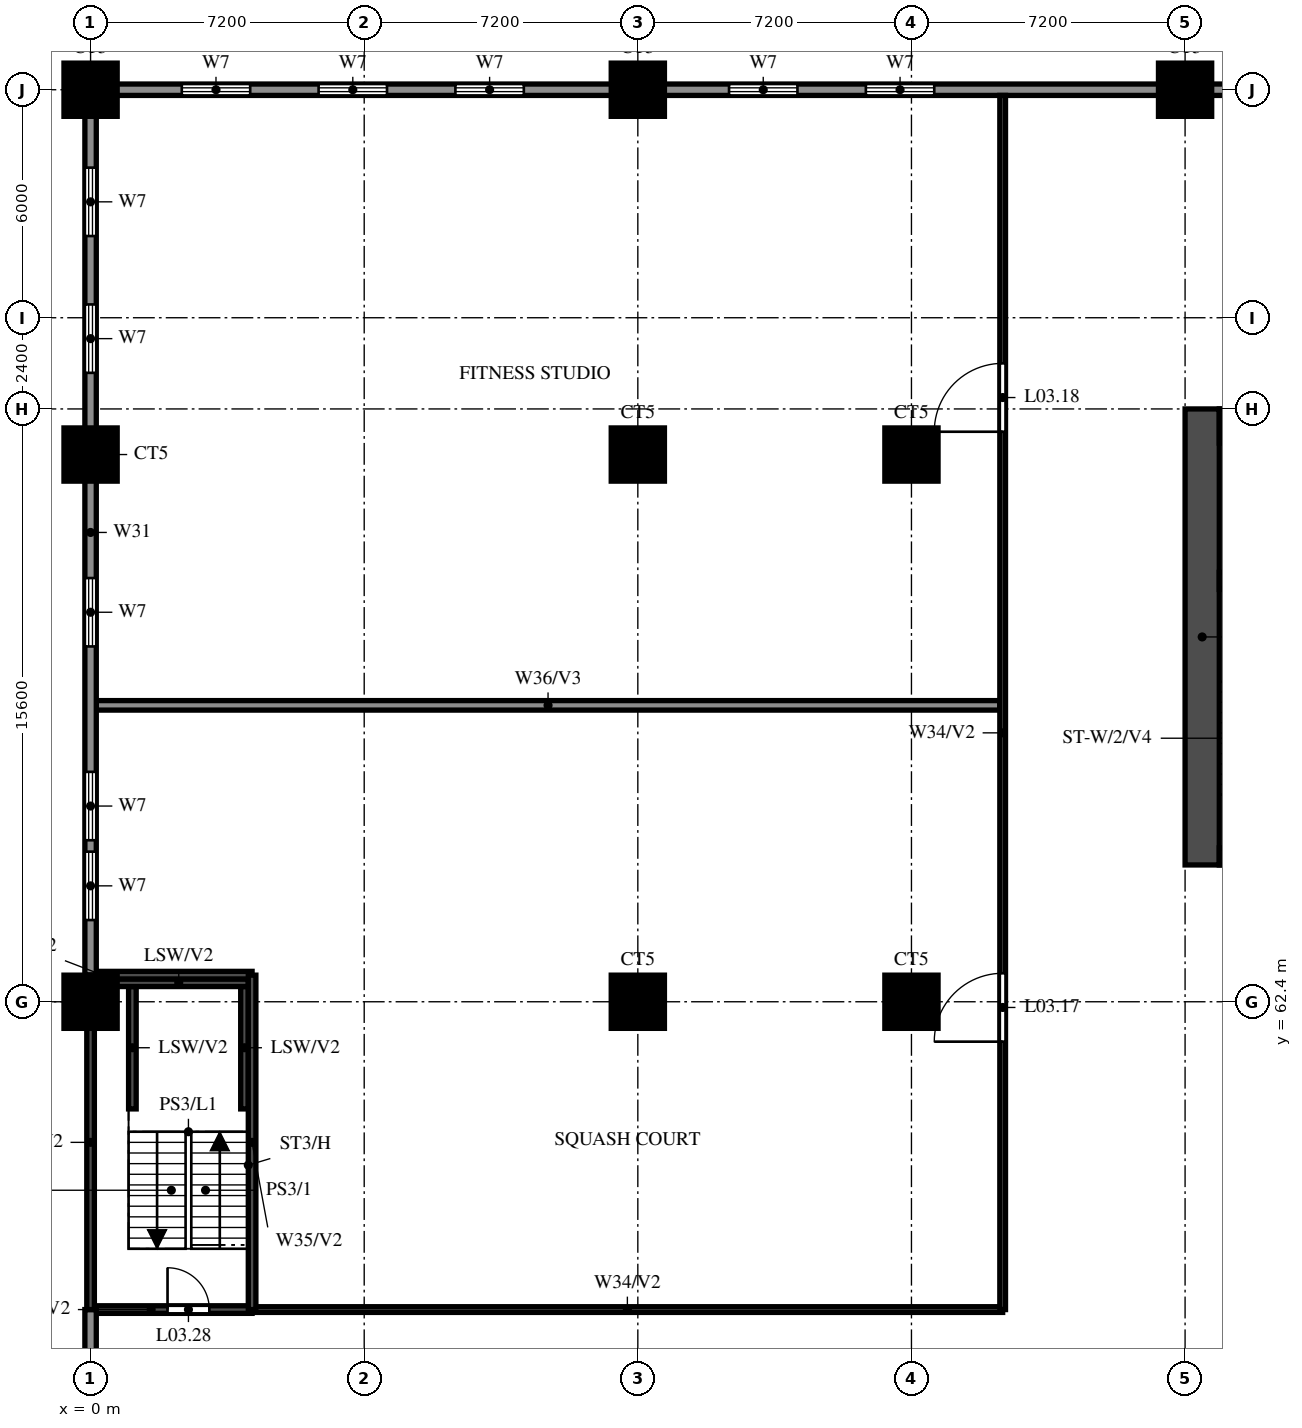
"""IFC4 building model, lengths in metres.
Left out: names, types, materials, properties, quantities, classifications, styles, units other than length and angle.
Written with IfcOpenShell. Run it as: python <this file> out.ifc"""

import sys

from ifc_helpers import new_model, si_unit, direction, frame, frame_2d, origin, origin_2d, place, context, subcontext, project, spatial, rectangle, circle, extrude, source, transform, mapped, element, fill, save


model = new_model("IFC4")
c1 = context("Model", 3, precision=1e-05, world=origin(), true_north=direction((0.0, 1.0)))
c2 = subcontext(c1, "Body", "Model", "MODEL_VIEW")
j1 = project(units=[si_unit("LENGTHUNIT", "METRE"), si_unit("PLANEANGLEUNIT", "RADIAN")], contexts=[c1])
p1 = place(None, origin())
s1 = spatial("IfcSite", under=j1, at=p1, CompositionType="ELEMENT")
p2 = place(p1, origin())
s2 = spatial("IfcBuilding", under=s1, at=p2, CompositionType="ELEMENT")
p3 = place(p2, frame((0.0, 0.0, 17.4)))
s3 = spatial("IfcBuildingStorey", under=s2, at=p3, CompositionType="ELEMENT", Elevation=17.4)
m1 = source(origin(), c2, "Body", "SweptSolid", [
    extrude(circle(Radius=0.7, at=origin_2d()), origin(), (0.0, 0.0, 1.0), 3.8),
])
for number, where, z_axis, x_axis in (
    (1, (0.0, 62.4, 0.0), (0.0, 0.0, 1.0), (1.0, 0.0, 0.0)),
    (2, (14.4, 62.4, 0.0), (0.0, 0.0, 1.0), (1.0, 0.0, 0.0)),
    (3, (21.6, 62.4, 0.0), (0.0, 0.0, 1.0), (1.0, 0.0, 0.0)),
    (4, (0.0, 76.8, 0.0), (0.0, 0.0, 1.0), (1.0, 0.0, 0.0)),
    (5, (14.4, 76.8, 0.0), (0.0, 0.0, 1.0), (1.0, 0.0, 0.0)),
    (6, (21.6, 76.8, 0.0), (0.0, 0.0, 1.0), (1.0, 0.0, 0.0)),
    (7, (0.0, 86.4, 0.0), (0.0, 0.0, 1.0), (1.0, 0.0, 0.0)),
    (8, (14.4, 86.4, 0.0), (0.0, 0.0, 1.0), (1.0, 0.0, 0.0)),
    (9, (28.8, 86.4, 0.0), (0.0, 0.0, 1.0), (1.0, 0.0, 0.0)),
):
    element("IfcColumn", number, at=place(p3, frame(where, z_axis=z_axis, x_axis=x_axis)), inside=s3, PredefinedType="COLUMN", context=c2, shape_type="MappedRepresentation", body=[
        mapped(m1, transform((0.0, 0.0, 0.0))),
    ])
p4 = place(p3, frame((29.25, 66.0, 0.0), z_axis=(0.0, 0.0, 1.0), x_axis=(0.0, 1.0, 0.0)))
e10 = element("IfcWall", 10, at=p4, inside=s3, PredefinedType="SHEAR", context=c2, shape_type="SweptSolid", body=[
    extrude(rectangle(XDim=12.0, YDim=0.9, at=frame_2d((6.0, 0.0))), origin(), (0.0, 0.0, 1.0), 3.8),
])
p5 = place(p3, frame((29.7, 77.55, 0.0), z_axis=(0.0, 0.0, 1.0), x_axis=(1.0, 0.0, 0.0)))
e11 = element("IfcWall", 11, at=p5, inside=s3, PredefinedType="SHEAR", context=c2, shape_type="SweptSolid", body=[
    extrude(rectangle(XDim=41.4, YDim=0.9, at=frame_2d((20.7, 0.0))), origin(), (0.0, 0.0, 1.0), 3.8),
])
p6 = place(p3, frame((29.7, 66.225, 0.0), z_axis=(0.0, 0.0, 1.0), x_axis=(1.0, 0.0, 0.0)))
e12 = element("IfcWall", 12, at=p6, inside=s3, PredefinedType="SHEAR", context=c2, shape_type="SweptSolid", body=[
    extrude(rectangle(XDim=41.4, YDim=0.45, at=frame_2d((20.7, 0.0))), origin(), (0.0, 0.0, 1.0), 3.8),
])
p7 = place(p6, frame((0.925, 0.0, 0.0)))
e13 = element("IfcOpeningElement", 13, at=p7, cuts=e12, PredefinedType="OPENING", context=c2, shape_type="SweptSolid", body=[
    extrude(rectangle(XDim=1.1, YDim=2.1, at=frame_2d((0.55, 1.05))), frame((0.0, 0.235, 0.0), z_axis=(0.0, -1.0, 0.0), x_axis=(1.0, 0.0, 0.0)), (0.0, 0.0, 1.0), 0.47),
])
p8 = place(p6, frame((3.738, 0.0, 0.0)))
e14 = element("IfcOpeningElement", 14, at=p8, cuts=e12, PredefinedType="OPENING", context=c2, shape_type="SweptSolid", body=[
    extrude(rectangle(XDim=1.8, YDim=2.1, at=frame_2d((0.9, 1.05))), frame((0.0, 0.235, 0.0), z_axis=(0.0, -1.0, 0.0), x_axis=(1.0, 0.0, 0.0)), (0.0, 0.0, 1.0), 0.47),
])
p9 = place(p3, frame((29.7, 73.475, 0.0), z_axis=(0.0, 0.0, 1.0), x_axis=(1.0, 0.0, 0.0)))
e15 = element("IfcWall", 15, at=p9, inside=s3, PredefinedType="SHEAR", context=c2, shape_type="SweptSolid", body=[
    extrude(rectangle(XDim=3.175, YDim=0.45, at=frame_2d((1.587, 0.0))), origin(), (0.0, 0.0, 1.0), 3.8),
])
for number, where, z_axis, x_axis in (
    (16, (1.1, 59.58, 0.0), (0.0, 0.0, 1.0), (0.0, 1.0, 0.0)),
    (17, (4.05, 59.58, 0.0), (0.0, 0.0, 1.0), (0.0, 1.0, 0.0)),
):
    element("IfcWall", number, at=place(p3, frame(where, z_axis=z_axis, x_axis=x_axis)), inside=s3, PredefinedType="SOLIDWALL", context=c2, shape_type="SweptSolid", body=[
        extrude(rectangle(XDim=3.22, YDim=0.2, at=frame_2d((1.61, 0.0))), origin(), (0.0, 0.0, 1.0), 1.9),
    ])
p10 = place(p3, frame((0.49, 62.9, 0.0), z_axis=(0.0, 0.0, 1.0), x_axis=(1.0, 0.0, 0.0)))
e18 = element("IfcWall", 18, at=p10, inside=s3, PredefinedType="SOLIDWALL", context=c2, shape_type="SweptSolid", body=[
    extrude(rectangle(XDim=3.66, YDim=0.2, at=frame_2d((1.83, 0.0))), origin(), (0.0, 0.0, 1.0), 1.9),
])
p11 = place(p3, frame((4.25, 54.3, 0.0), z_axis=(0.0, 0.0, 1.0), x_axis=(1.0, 0.0, 0.0)))
e19 = element("IfcWall", 19, at=p11, inside=s3, PredefinedType="PARTITIONING", context=c2, shape_type="SweptSolid", body=[
    extrude(rectangle(XDim=19.75, YDim=0.15, at=frame_2d((9.875, 0.0))), origin(), (0.0, 0.0, 1.0), 2.6),
])
p12 = place(p3, frame((0.0, 54.3, 0.0), z_axis=(0.0, 0.0, 1.0), x_axis=(1.0, 0.0, 0.0)))
e20 = element("IfcWall", 20, at=p12, inside=s3, PredefinedType="SOLIDWALL", context=c2, shape_type="SweptSolid", body=[
    extrude(rectangle(XDim=4.25, YDim=0.2, at=frame_2d((2.125, 0.0))), origin(), (0.0, 0.0, 1.0), 3.8),
])
p13 = place(p12, frame((2.025, 0.0, 0.0)))
e21 = element("IfcOpeningElement", 21, at=p13, cuts=e20, PredefinedType="OPENING", context=c2, shape_type="SweptSolid", body=[
    extrude(rectangle(XDim=1.1, YDim=2.1, at=frame_2d((0.55, 1.05))), frame((0.0, 0.11, 0.0), z_axis=(0.0, -1.0, 0.0), x_axis=(1.0, 0.0, 0.0)), (0.0, 0.0, 1.0), 0.22),
])
p14 = place(p3, frame((0.0, 63.1, 0.0), z_axis=(0.0, 0.0, 1.0), x_axis=(1.0, 0.0, 0.0)))
e22 = element("IfcWall", 22, at=p14, inside=s3, PredefinedType="SOLIDWALL", context=c2, shape_type="SweptSolid", body=[
    extrude(rectangle(XDim=4.25, YDim=0.2, at=frame_2d((2.125, 0.0))), origin(), (0.0, 0.0, 1.0), 3.8),
])
p15 = place(p3, frame((0.15, 70.2, 0.0), z_axis=(0.0, 0.0, 1.0), x_axis=(1.0, 0.0, 0.0)))
e23 = element("IfcWall", 23, at=p15, inside=s3, PredefinedType="SOLIDWALL", context=c2, shape_type="SweptSolid", body=[
    extrude(rectangle(XDim=23.775, YDim=0.25, at=frame_2d((11.888, 0.0))), origin(), (0.0, 0.0, 1.0), 2.6),
])
p16 = place(p3, frame((0.0, 86.4, 0.0), z_axis=(0.0, 0.0, 1.0), x_axis=(1.0, 0.0, 0.0)))
e24 = element("IfcWall", 24, at=p16, inside=s3, PredefinedType="SOLIDWALL", context=c2, shape_type="SweptSolid", body=[
    extrude(rectangle(XDim=100.8, YDim=0.3, at=frame_2d((50.4, 0.0))), origin(), (0.0, 0.0, 1.0), 3.8),
])
p17 = place(p16, frame((2.4, 0.0, 0.6)))
e25 = element("IfcOpeningElement", 25, at=p17, cuts=e24, PredefinedType="OPENING", context=c2, shape_type="SweptSolid", body=[
    extrude(rectangle(XDim=1.8, YDim=2.4, at=frame_2d((0.9, 1.2))), frame((0.0, 0.16, 0.0), z_axis=(0.0, -1.0, 0.0), x_axis=(1.0, 0.0, 0.0)), (0.0, 0.0, 1.0), 0.32),
])
p18 = place(p16, frame((6.0, 0.0, 0.6)))
e26 = element("IfcOpeningElement", 26, at=p18, cuts=e24, PredefinedType="OPENING", context=c2, shape_type="SweptSolid", body=[
    extrude(rectangle(XDim=1.8, YDim=2.4, at=frame_2d((0.9, 1.2))), frame((0.0, 0.16, 0.0), z_axis=(0.0, -1.0, 0.0), x_axis=(1.0, 0.0, 0.0)), (0.0, 0.0, 1.0), 0.32),
])
p19 = place(p16, frame((9.6, 0.0, 0.6)))
e27 = element("IfcOpeningElement", 27, at=p19, cuts=e24, PredefinedType="OPENING", context=c2, shape_type="SweptSolid", body=[
    extrude(rectangle(XDim=1.8, YDim=2.4, at=frame_2d((0.9, 1.2))), frame((0.0, 0.16, 0.0), z_axis=(0.0, -1.0, 0.0), x_axis=(1.0, 0.0, 0.0)), (0.0, 0.0, 1.0), 0.32),
])
p20 = place(p16, frame((16.8, 0.0, 0.6)))
e28 = element("IfcOpeningElement", 28, at=p20, cuts=e24, PredefinedType="OPENING", context=c2, shape_type="SweptSolid", body=[
    extrude(rectangle(XDim=1.8, YDim=2.4, at=frame_2d((0.9, 1.2))), frame((0.0, 0.16, 0.0), z_axis=(0.0, -1.0, 0.0), x_axis=(1.0, 0.0, 0.0)), (0.0, 0.0, 1.0), 0.32),
])
p21 = place(p16, frame((20.4, 0.0, 0.6)))
e29 = element("IfcOpeningElement", 29, at=p21, cuts=e24, PredefinedType="OPENING", context=c2, shape_type="SweptSolid", body=[
    extrude(rectangle(XDim=1.8, YDim=2.4, at=frame_2d((0.9, 1.2))), frame((0.0, 0.16, 0.0), z_axis=(0.0, -1.0, 0.0), x_axis=(1.0, 0.0, 0.0)), (0.0, 0.0, 1.0), 0.32),
])
p22 = place(p16, frame((78.0, 0.0, 0.6)))
e30 = element("IfcOpeningElement", 30, at=p22, cuts=e24, PredefinedType="OPENING", context=c2, shape_type="SweptSolid", body=[
    extrude(rectangle(XDim=1.8, YDim=2.4, at=frame_2d((0.9, 1.2))), frame((0.0, 0.16, 0.0), z_axis=(0.0, -1.0, 0.0), x_axis=(1.0, 0.0, 0.0)), (0.0, 0.0, 1.0), 0.32),
])
p23 = place(p16, frame((81.6, 0.0, 0.6)))
e31 = element("IfcOpeningElement", 31, at=p23, cuts=e24, PredefinedType="OPENING", context=c2, shape_type="SweptSolid", body=[
    extrude(rectangle(XDim=1.8, YDim=2.4, at=frame_2d((0.9, 1.2))), frame((0.0, 0.16, 0.0), z_axis=(0.0, -1.0, 0.0), x_axis=(1.0, 0.0, 0.0)), (0.0, 0.0, 1.0), 0.32),
])
p24 = place(p16, frame((88.8, 0.0, 0.6)))
e32 = element("IfcOpeningElement", 32, at=p24, cuts=e24, PredefinedType="OPENING", context=c2, shape_type="SweptSolid", body=[
    extrude(rectangle(XDim=1.8, YDim=2.4, at=frame_2d((0.9, 1.2))), frame((0.0, 0.16, 0.0), z_axis=(0.0, -1.0, 0.0), x_axis=(1.0, 0.0, 0.0)), (0.0, 0.0, 1.0), 0.32),
])
p25 = place(p16, frame((92.4, 0.0, 0.6)))
e33 = element("IfcOpeningElement", 33, at=p25, cuts=e24, PredefinedType="OPENING", context=c2, shape_type="SweptSolid", body=[
    extrude(rectangle(XDim=1.8, YDim=2.4, at=frame_2d((0.9, 1.2))), frame((0.0, 0.16, 0.0), z_axis=(0.0, -1.0, 0.0), x_axis=(1.0, 0.0, 0.0)), (0.0, 0.0, 1.0), 0.32),
])
p26 = place(p16, frame((96.0, 0.0, 0.6)))
e34 = element("IfcOpeningElement", 34, at=p26, cuts=e24, PredefinedType="OPENING", context=c2, shape_type="SweptSolid", body=[
    extrude(rectangle(XDim=1.8, YDim=2.4, at=frame_2d((0.9, 1.2))), frame((0.0, 0.16, 0.0), z_axis=(0.0, -1.0, 0.0), x_axis=(1.0, 0.0, 0.0)), (0.0, 0.0, 1.0), 0.32),
])
p27 = place(p3, frame((0.0, 51.1, 0.0), z_axis=(0.0, 0.0, 1.0), x_axis=(0.0, 1.0, 0.0)))
e35 = element("IfcWall", 35, at=p27, inside=s3, PredefinedType="SOLIDWALL", context=c2, shape_type="SweptSolid", body=[
    extrude(rectangle(XDim=3.2, YDim=0.3, at=frame_2d((1.6, 0.0))), origin(), (0.0, 0.0, 1.0), 3.8),
])
p28 = place(p3, frame((0.0, 63.1, 0.0), z_axis=(0.0, 0.0, 1.0), x_axis=(0.0, 1.0, 0.0)))
e36 = element("IfcWall", 36, at=p28, inside=s3, PredefinedType="SOLIDWALL", context=c2, shape_type="SweptSolid", body=[
    extrude(rectangle(XDim=23.3, YDim=0.3, at=frame_2d((11.65, 0.0))), origin(), (0.0, 0.0, 1.0), 3.8),
])
p29 = place(p28, frame((1.45, 0.0, 0.6)))
e37 = element("IfcOpeningElement", 37, at=p29, cuts=e36, PredefinedType="OPENING", context=c2, shape_type="SweptSolid", body=[
    extrude(rectangle(XDim=1.8, YDim=2.4, at=frame_2d((0.9, 1.2))), frame((0.0, 0.16, 0.0), z_axis=(0.0, -1.0, 0.0), x_axis=(1.0, 0.0, 0.0)), (0.0, 0.0, 1.0), 0.32),
])
p30 = place(p28, frame((3.55, 0.0, 0.6)))
e38 = element("IfcOpeningElement", 38, at=p30, cuts=e36, PredefinedType="OPENING", context=c2, shape_type="SweptSolid", body=[
    extrude(rectangle(XDim=1.8, YDim=2.4, at=frame_2d((0.9, 1.2))), frame((0.0, 0.16, 0.0), z_axis=(0.0, -1.0, 0.0), x_axis=(1.0, 0.0, 0.0)), (0.0, 0.0, 1.0), 0.32),
])
p31 = place(p28, frame((8.65, 0.0, 0.6)))
e39 = element("IfcOpeningElement", 39, at=p31, cuts=e36, PredefinedType="OPENING", context=c2, shape_type="SweptSolid", body=[
    extrude(rectangle(XDim=1.8, YDim=2.4, at=frame_2d((0.9, 1.2))), frame((0.0, 0.16, 0.0), z_axis=(0.0, -1.0, 0.0), x_axis=(1.0, 0.0, 0.0)), (0.0, 0.0, 1.0), 0.32),
])
p32 = place(p28, frame((15.85, 0.0, 0.6)))
e40 = element("IfcOpeningElement", 40, at=p32, cuts=e36, PredefinedType="OPENING", context=c2, shape_type="SweptSolid", body=[
    extrude(rectangle(XDim=1.8, YDim=2.4, at=frame_2d((0.9, 1.2))), frame((0.0, 0.16, 0.0), z_axis=(0.0, -1.0, 0.0), x_axis=(1.0, 0.0, 0.0)), (0.0, 0.0, 1.0), 0.32),
])
p33 = place(p28, frame((19.45, 0.0, 0.6)))
e41 = element("IfcOpeningElement", 41, at=p33, cuts=e36, PredefinedType="OPENING", context=c2, shape_type="SweptSolid", body=[
    extrude(rectangle(XDim=1.8, YDim=2.4, at=frame_2d((0.9, 1.2))), frame((0.0, 0.16, 0.0), z_axis=(0.0, -1.0, 0.0), x_axis=(1.0, 0.0, 0.0)), (0.0, 0.0, 1.0), 0.32),
])
for number, where, z_axis, x_axis in (
    (42, (0.0, 54.3, 0.0), (0.0, 0.0, 1.0), (0.0, 1.0, 0.0)),
    (43, (4.25, 54.3, 0.0), (0.0, 0.0, 1.0), (0.0, 1.0, 0.0)),
):
    element("IfcWall", number, at=place(p3, frame(where, z_axis=z_axis, x_axis=x_axis)), inside=s3, PredefinedType="SOLIDWALL", context=c2, shape_type="SweptSolid", body=[
        extrude(rectangle(XDim=8.8, YDim=0.2, at=frame_2d((4.4, 0.0))), origin(), (0.0, 0.0, 1.0), 3.8),
    ])
p34 = place(p3, frame((24.0, 54.3, 0.0), z_axis=(0.0, 0.0, 1.0), x_axis=(0.0, 1.0, 0.0)))
e44 = element("IfcWall", 44, at=p34, inside=s3, PredefinedType="PARTITIONING", context=c2, shape_type="SweptSolid", body=[
    extrude(rectangle(XDim=31.95, YDim=0.15, at=frame_2d((15.975, 0.0))), origin(), (0.0, 0.0, 1.0), 2.6),
])
p35 = place(p34, frame((7.05, 0.0, 0.0)))
e45 = element("IfcOpeningElement", 45, at=p35, cuts=e44, PredefinedType="OPENING", context=c2, shape_type="SweptSolid", body=[
    extrude(rectangle(XDim=1.8, YDim=2.1, at=frame_2d((0.9, 1.05))), frame((0.0, 0.085, 0.0), z_axis=(0.0, -1.0, 0.0), x_axis=(1.0, 0.0, 0.0)), (0.0, 0.0, 1.0), 0.17),
])
p36 = place(p34, frame((23.1, 0.0, 0.0)))
e46 = element("IfcOpeningElement", 46, at=p36, cuts=e44, PredefinedType="OPENING", context=c2, shape_type="SweptSolid", body=[
    extrude(rectangle(XDim=1.8, YDim=2.1, at=frame_2d((0.9, 1.05))), frame((0.0, 0.085, 0.0), z_axis=(0.0, -1.0, 0.0), x_axis=(1.0, 0.0, 0.0)), (0.0, 0.0, 1.0), 0.17),
])
p37 = place(p35, origin())
e47 = element("IfcDoor", 47, at=p37, inside=s3, OperationType="DOUBLE_DOOR_SINGLE_SWING", PredefinedType="DOOR", context=c2, shape_type="SweptSolid", body=[
    extrude(rectangle(XDim=1.8, YDim=2.1, at=frame_2d((0.9, 1.05))), frame((0.0, 0.025, 0.0), z_axis=(0.0, -1.0, 0.0), x_axis=(1.0, 0.0, 0.0)), (0.0, 0.0, 1.0), 0.05),
])
fill(e45, e47)
p38 = place(p36, origin())
e48 = element("IfcDoor", 48, at=p38, inside=s3, OperationType="DOUBLE_DOOR_SINGLE_SWING", PredefinedType="DOOR", context=c2, shape_type="SweptSolid", body=[
    extrude(rectangle(XDim=1.8, YDim=2.1, at=frame_2d((0.9, 1.05))), frame((0.0, 0.025, 0.0), z_axis=(0.0, -1.0, 0.0), x_axis=(1.0, 0.0, 0.0)), (0.0, 0.0, 1.0), 0.05),
])
fill(e46, e48)
p39 = place(p13, origin())
e49 = element("IfcDoor", 49, at=p39, inside=s3, OperationType="SINGLE_SWING_RIGHT", PredefinedType="DOOR", context=c2, shape_type="SweptSolid", body=[
    extrude(rectangle(XDim=1.1, YDim=2.1, at=frame_2d((0.55, 1.05))), frame((0.0, 0.025, 0.0), z_axis=(0.0, -1.0, 0.0), x_axis=(1.0, 0.0, 0.0)), (0.0, 0.0, 1.0), 0.05),
])
fill(e21, e49)
p40 = place(p17, origin())
e50 = element("IfcWindow", 50, at=p40, inside=s3, PartitioningType="DOUBLE_PANEL_VERTICAL", PredefinedType="WINDOW", context=c2, shape_type="SweptSolid", body=[
    extrude(rectangle(XDim=1.8, YDim=2.4, at=frame_2d((0.9, 1.2))), frame((0.0, 0.03, 0.0), z_axis=(0.0, -1.0, 0.0), x_axis=(1.0, 0.0, 0.0)), (0.0, 0.0, 1.0), 0.06),
])
fill(e25, e50)
p41 = place(p18, origin())
e51 = element("IfcWindow", 51, at=p41, inside=s3, PartitioningType="DOUBLE_PANEL_VERTICAL", PredefinedType="WINDOW", context=c2, shape_type="SweptSolid", body=[
    extrude(rectangle(XDim=1.8, YDim=2.4, at=frame_2d((0.9, 1.2))), frame((0.0, 0.03, 0.0), z_axis=(0.0, -1.0, 0.0), x_axis=(1.0, 0.0, 0.0)), (0.0, 0.0, 1.0), 0.06),
])
fill(e26, e51)
p42 = place(p19, origin())
e52 = element("IfcWindow", 52, at=p42, inside=s3, PartitioningType="DOUBLE_PANEL_VERTICAL", PredefinedType="WINDOW", context=c2, shape_type="SweptSolid", body=[
    extrude(rectangle(XDim=1.8, YDim=2.4, at=frame_2d((0.9, 1.2))), frame((0.0, 0.03, 0.0), z_axis=(0.0, -1.0, 0.0), x_axis=(1.0, 0.0, 0.0)), (0.0, 0.0, 1.0), 0.06),
])
fill(e27, e52)
p43 = place(p20, origin())
e53 = element("IfcWindow", 53, at=p43, inside=s3, PartitioningType="DOUBLE_PANEL_VERTICAL", PredefinedType="WINDOW", context=c2, shape_type="SweptSolid", body=[
    extrude(rectangle(XDim=1.8, YDim=2.4, at=frame_2d((0.9, 1.2))), frame((0.0, 0.03, 0.0), z_axis=(0.0, -1.0, 0.0), x_axis=(1.0, 0.0, 0.0)), (0.0, 0.0, 1.0), 0.06),
])
fill(e28, e53)
p44 = place(p21, origin())
e54 = element("IfcWindow", 54, at=p44, inside=s3, PartitioningType="DOUBLE_PANEL_VERTICAL", PredefinedType="WINDOW", context=c2, shape_type="SweptSolid", body=[
    extrude(rectangle(XDim=1.8, YDim=2.4, at=frame_2d((0.9, 1.2))), frame((0.0, 0.03, 0.0), z_axis=(0.0, -1.0, 0.0), x_axis=(1.0, 0.0, 0.0)), (0.0, 0.0, 1.0), 0.06),
])
fill(e29, e54)
p45 = place(p29, origin())
e55 = element("IfcWindow", 55, at=p45, inside=s3, PartitioningType="DOUBLE_PANEL_VERTICAL", PredefinedType="WINDOW", context=c2, shape_type="SweptSolid", body=[
    extrude(rectangle(XDim=1.8, YDim=2.4, at=frame_2d((0.9, 1.2))), frame((0.0, 0.03, 0.0), z_axis=(0.0, -1.0, 0.0), x_axis=(1.0, 0.0, 0.0)), (0.0, 0.0, 1.0), 0.06),
])
fill(e37, e55)
p46 = place(p30, origin())
e56 = element("IfcWindow", 56, at=p46, inside=s3, PartitioningType="DOUBLE_PANEL_VERTICAL", PredefinedType="WINDOW", context=c2, shape_type="SweptSolid", body=[
    extrude(rectangle(XDim=1.8, YDim=2.4, at=frame_2d((0.9, 1.2))), frame((0.0, 0.03, 0.0), z_axis=(0.0, -1.0, 0.0), x_axis=(1.0, 0.0, 0.0)), (0.0, 0.0, 1.0), 0.06),
])
fill(e38, e56)
p47 = place(p31, origin())
e57 = element("IfcWindow", 57, at=p47, inside=s3, PartitioningType="DOUBLE_PANEL_VERTICAL", PredefinedType="WINDOW", context=c2, shape_type="SweptSolid", body=[
    extrude(rectangle(XDim=1.8, YDim=2.4, at=frame_2d((0.9, 1.2))), frame((0.0, 0.03, 0.0), z_axis=(0.0, -1.0, 0.0), x_axis=(1.0, 0.0, 0.0)), (0.0, 0.0, 1.0), 0.06),
])
fill(e39, e57)
p48 = place(p32, origin())
e58 = element("IfcWindow", 58, at=p48, inside=s3, PartitioningType="DOUBLE_PANEL_VERTICAL", PredefinedType="WINDOW", context=c2, shape_type="SweptSolid", body=[
    extrude(rectangle(XDim=1.8, YDim=2.4, at=frame_2d((0.9, 1.2))), frame((0.0, 0.03, 0.0), z_axis=(0.0, -1.0, 0.0), x_axis=(1.0, 0.0, 0.0)), (0.0, 0.0, 1.0), 0.06),
])
fill(e40, e58)
p49 = place(p33, origin())
e59 = element("IfcWindow", 59, at=p49, inside=s3, PartitioningType="DOUBLE_PANEL_VERTICAL", PredefinedType="WINDOW", context=c2, shape_type="SweptSolid", body=[
    extrude(rectangle(XDim=1.8, YDim=2.4, at=frame_2d((0.9, 1.2))), frame((0.0, 0.03, 0.0), z_axis=(0.0, -1.0, 0.0), x_axis=(1.0, 0.0, 0.0)), (0.0, 0.0, 1.0), 0.06),
])
fill(e41, e59)
save(model, sys.argv[1])
